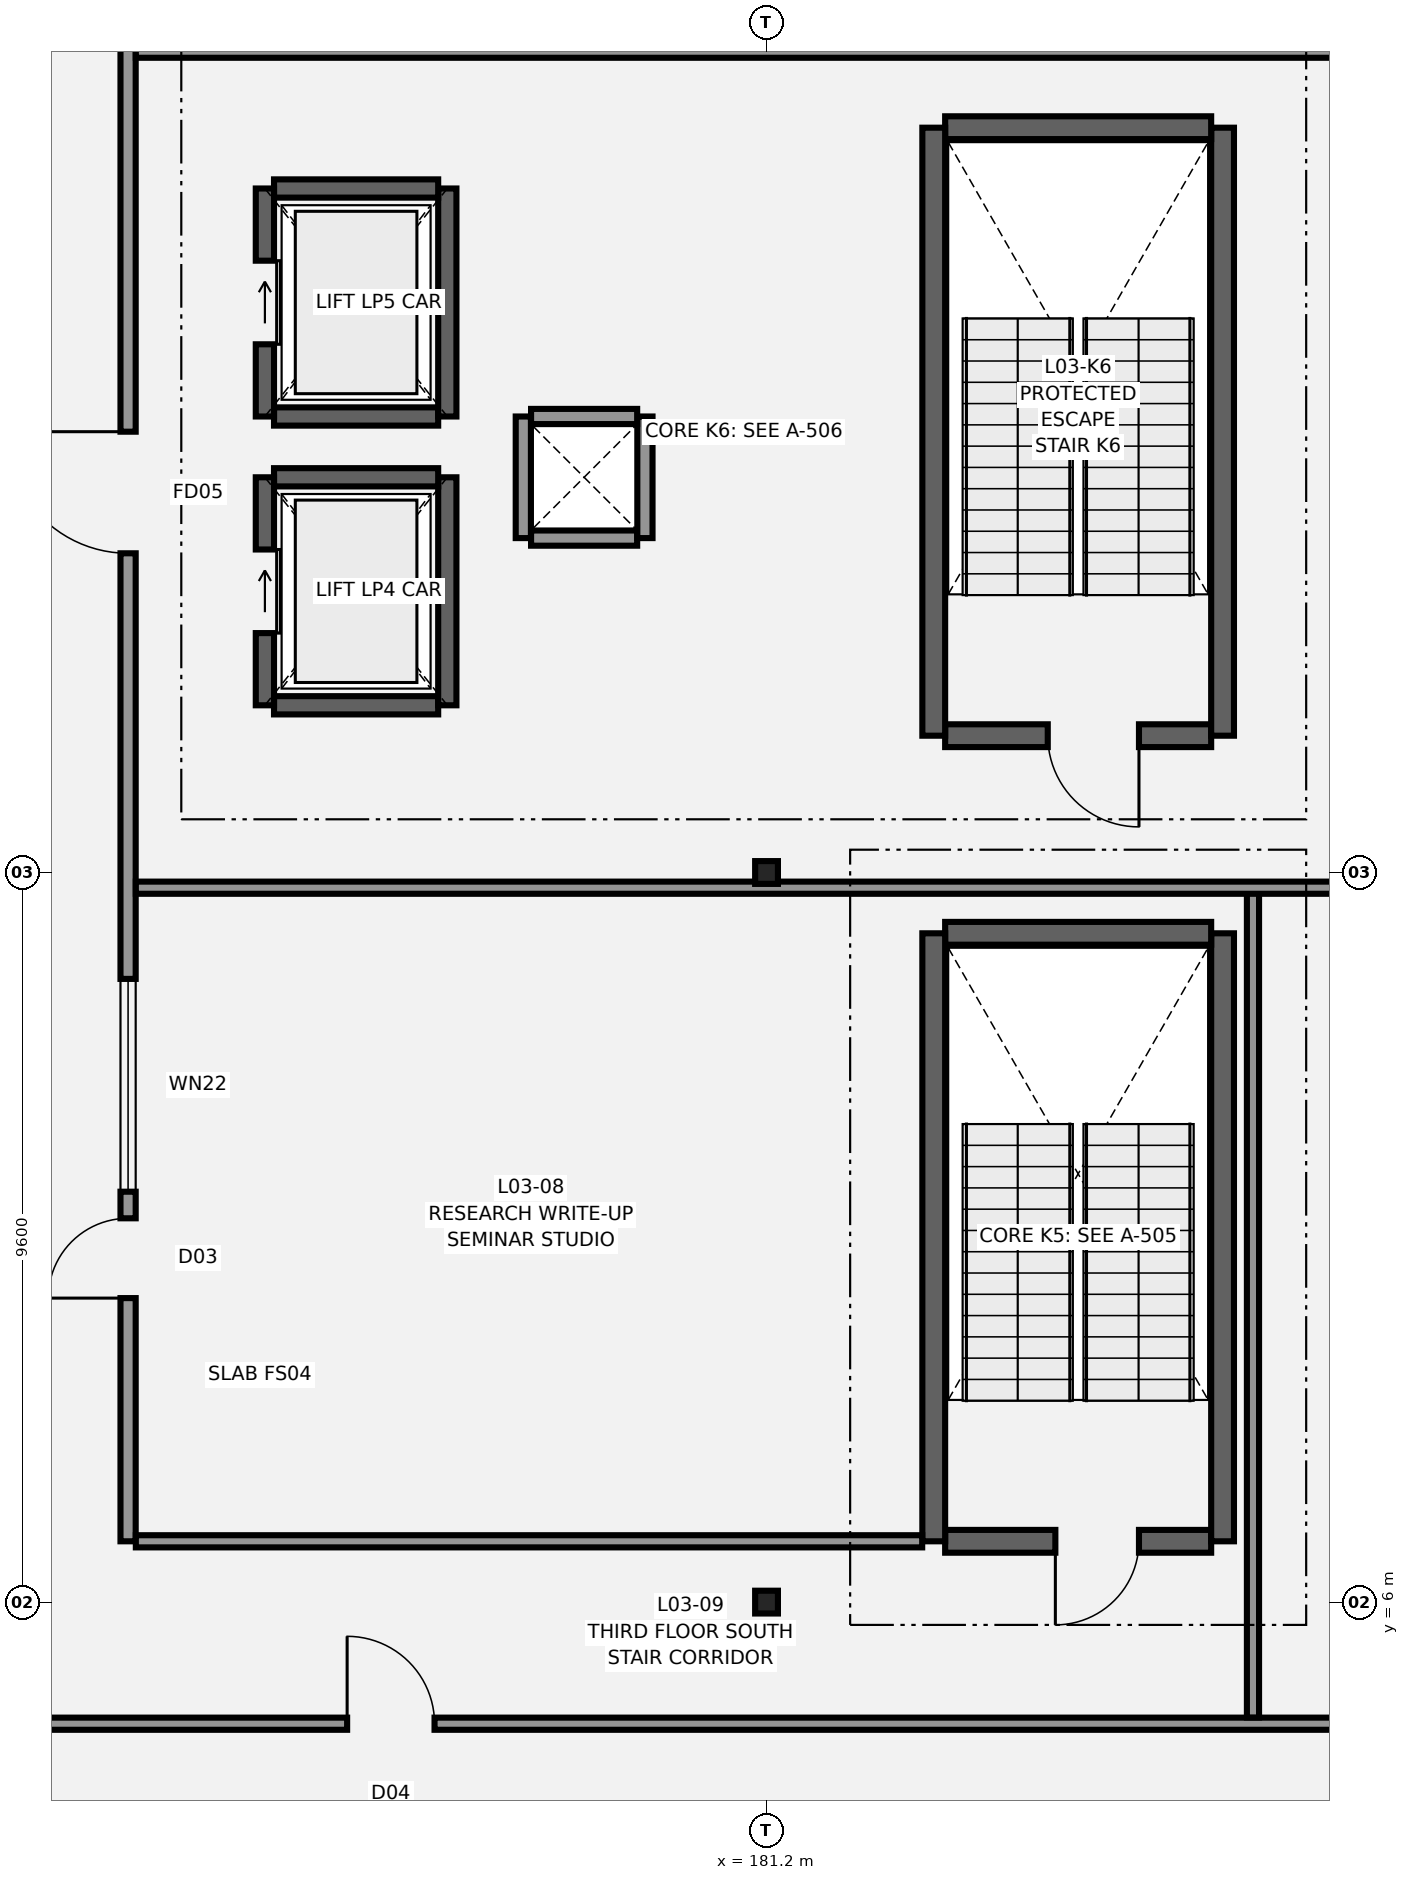
"""IFC4 building model, lengths in metres.
Left out: names, types, materials, properties, quantities, classifications, styles, units other than length and angle.
Written with IfcOpenShell. Run it as: python <this file> out.ifc"""

import sys

from ifc_helpers import new_model, si_unit, direction, frame, frame_2d, origin, origin_2d, place, context, subcontext, project, spatial, rectangle, i_section, extrude, element, fill, save


model = new_model("IFC4")
c1 = context("Model", 3, precision=1e-05, world=origin(), true_north=direction((0.0, 1.0)))
c2 = subcontext(c1, "Body", "Model", "MODEL_VIEW")
j1 = project(units=[si_unit("LENGTHUNIT", "METRE"), si_unit("PLANEANGLEUNIT", "RADIAN")], contexts=[c1])
p1 = place(None, origin())
s1 = spatial("IfcSite", under=j1, at=p1, CompositionType="ELEMENT")
p2 = place(p1, origin())
s2 = spatial("IfcBuilding", under=s1, at=p2, CompositionType="ELEMENT")
p3 = place(p2, frame((0.0, 0.0, 14.4)))
s3 = spatial("IfcBuildingStorey", under=s2, at=p3, CompositionType="ELEMENT", Elevation=14.4)
for number, where, z_axis, x_axis in (
    (1, (181.2, 6.0, 0.0), (0.0, 0.0, 1.0), (1.0, 0.0, 0.0)),
    (2, (181.2, 15.6, 0.0), (0.0, 0.0, 1.0), (1.0, 0.0, 0.0)),
):
    element("IfcColumn", number, at=place(p3, frame(where, z_axis=z_axis, x_axis=x_axis)), inside=s3, PredefinedType="COLUMN", context=c2, shape_type="SweptSolid", body=[
        extrude(i_section(OverallWidth=0.3, OverallDepth=0.3, WebThickness=0.011, FlangeThickness=0.019, FilletRadius=0.027, at=origin_2d()), origin(), (0.0, 0.0, 1.0), 4.2),
    ])
p4 = place(p3, frame((187.05, 6.8, 0.0), z_axis=(0.0, 0.0, 1.0), x_axis=(-1.0, 0.0, 0.0)))
e3 = element("IfcWall", 3, at=p4, inside=s3, PredefinedType="SHEAR", context=c2, shape_type="SweptSolid", body=[
    extrude(rectangle(XDim=3.5, YDim=0.3, at=frame_2d((1.75, 0.0))), origin(), (0.0, 0.0, 1.0), 3.98),
])
p5 = place(p4, frame((0.95, 0.0, 0.0)))
e4 = element("IfcOpeningElement", 4, at=p5, cuts=e3, PredefinedType="OPENING", context=c2, shape_type="SweptSolid", body=[
    extrude(rectangle(XDim=1.1, YDim=2.15, at=frame_2d((0.55, 1.075))), frame((0.0, 0.16, 0.0), z_axis=(0.0, -1.0, 0.0), x_axis=(1.0, 0.0, 0.0)), (0.0, 0.0, 1.0), 0.32),
])
p6 = place(p3, frame((187.2, 6.8, 0.0), z_axis=(0.0, 0.0, 1.0), x_axis=(0.0, 1.0, 0.0)))
e5 = element("IfcWall", 5, at=p6, inside=s3, PredefinedType="SHEAR", context=c2, shape_type="SweptSolid", body=[
    extrude(rectangle(XDim=8.0, YDim=0.3, at=frame_2d((4.0, 0.0))), origin(), (0.0, 0.0, 1.0), 3.98),
])
p7 = place(p3, frame((187.05, 14.8, 0.0), z_axis=(0.0, 0.0, 1.0), x_axis=(-1.0, 0.0, 0.0)))
e6 = element("IfcWall", 6, at=p7, inside=s3, PredefinedType="SHEAR", context=c2, shape_type="SweptSolid", body=[
    extrude(rectangle(XDim=3.5, YDim=0.3, at=frame_2d((1.75, 0.0))), origin(), (0.0, 0.0, 1.0), 3.98),
])
p8 = place(p3, frame((183.4, 14.8, 0.0), z_axis=(0.0, 0.0, 1.0), x_axis=(0.0, -1.0, 0.0)))
e7 = element("IfcWall", 7, at=p8, inside=s3, PredefinedType="SHEAR", context=c2, shape_type="SweptSolid", body=[
    extrude(rectangle(XDim=8.0, YDim=0.3, at=frame_2d((4.0, 0.0))), origin(), (0.0, 0.0, 1.0), 3.98),
])
p9 = place(p3, frame((187.05, 17.4, 0.0), z_axis=(0.0, 0.0, 1.0), x_axis=(-1.0, 0.0, 0.0)))
e8 = element("IfcWall", 8, at=p9, inside=s3, PredefinedType="SHEAR", context=c2, shape_type="SweptSolid", body=[
    extrude(rectangle(XDim=3.5, YDim=0.3, at=frame_2d((1.75, 0.0))), origin(), (0.0, 0.0, 1.0), 3.98),
])
p10 = place(p9, frame((0.95, 0.0, 0.0)))
e9 = element("IfcOpeningElement", 9, at=p10, cuts=e8, PredefinedType="OPENING", context=c2, shape_type="SweptSolid", body=[
    extrude(rectangle(XDim=1.2, YDim=2.2, at=frame_2d((0.6, 1.1))), frame((0.0, 0.16, 0.0), z_axis=(0.0, -1.0, 0.0), x_axis=(1.0, 0.0, 0.0)), (0.0, 0.0, 1.0), 0.32),
])
p11 = place(p3, frame((187.2, 17.4, 0.0), z_axis=(0.0, 0.0, 1.0), x_axis=(0.0, 1.0, 0.0)))
e10 = element("IfcWall", 10, at=p11, inside=s3, PredefinedType="SHEAR", context=c2, shape_type="SweptSolid", body=[
    extrude(rectangle(XDim=8.0, YDim=0.3, at=frame_2d((4.0, 0.0))), origin(), (0.0, 0.0, 1.0), 3.98),
])
p12 = place(p3, frame((187.05, 25.4, 0.0), z_axis=(0.0, 0.0, 1.0), x_axis=(-1.0, 0.0, 0.0)))
e11 = element("IfcWall", 11, at=p12, inside=s3, PredefinedType="SHEAR", context=c2, shape_type="SweptSolid", body=[
    extrude(rectangle(XDim=3.5, YDim=0.3, at=frame_2d((1.75, 0.0))), origin(), (0.0, 0.0, 1.0), 3.98),
])
p13 = place(p3, frame((183.4, 25.4, 0.0), z_axis=(0.0, 0.0, 1.0), x_axis=(0.0, -1.0, 0.0)))
e12 = element("IfcWall", 12, at=p13, inside=s3, PredefinedType="SHEAR", context=c2, shape_type="SweptSolid", body=[
    extrude(rectangle(XDim=8.0, YDim=0.3, at=frame_2d((4.0, 0.0))), origin(), (0.0, 0.0, 1.0), 3.98),
])
p14 = place(p3, frame((174.72, 17.8, 0.0), z_axis=(0.0, 0.0, 1.0), x_axis=(1.0, 0.0, 0.0)))
e13 = element("IfcWall", 13, at=p14, inside=s3, PredefinedType="SHEAR", context=c2, shape_type="SweptSolid", body=[
    extrude(rectangle(XDim=2.16, YDim=0.24, at=frame_2d((1.08, 0.0))), origin(), (0.0, 0.0, 1.0), 3.98),
])
p15 = place(p3, frame((177.0, 17.8, 0.0), z_axis=(0.0, 0.0, 1.0), x_axis=(0.0, 1.0, 0.0)))
e14 = element("IfcWall", 14, at=p15, inside=s3, PredefinedType="SHEAR", context=c2, shape_type="SweptSolid", body=[
    extrude(rectangle(XDim=3.0, YDim=0.24, at=frame_2d((1.5, 0.0))), origin(), (0.0, 0.0, 1.0), 3.98),
])
p16 = place(p3, frame((176.88, 20.8, 0.0), z_axis=(0.0, 0.0, 1.0), x_axis=(-1.0, 0.0, 0.0)))
e15 = element("IfcWall", 15, at=p16, inside=s3, PredefinedType="SHEAR", context=c2, shape_type="SweptSolid", body=[
    extrude(rectangle(XDim=2.16, YDim=0.24, at=frame_2d((1.08, 0.0))), origin(), (0.0, 0.0, 1.0), 3.98),
])
p17 = place(p3, frame((174.6, 20.8, 0.0), z_axis=(0.0, 0.0, 1.0), x_axis=(0.0, -1.0, 0.0)))
e16 = element("IfcWall", 16, at=p17, inside=s3, PredefinedType="SHEAR", context=c2, shape_type="SweptSolid", body=[
    extrude(rectangle(XDim=3.0, YDim=0.24, at=frame_2d((1.5, 0.0))), origin(), (0.0, 0.0, 1.0), 3.98),
])
p18 = place(p17, frame((0.95, 0.0, 0.0)))
e17 = element("IfcOpeningElement", 17, at=p18, cuts=e16, PredefinedType="OPENING", context=c2, shape_type="SweptSolid", body=[
    extrude(rectangle(XDim=1.1, YDim=2.1, at=frame_2d((0.55, 1.05))), frame((0.0, 0.13, 0.0), z_axis=(0.0, -1.0, 0.0), x_axis=(1.0, 0.0, 0.0)), (0.0, 0.0, 1.0), 0.26),
])
p19 = place(p3, frame((174.72, 21.6, 0.0), z_axis=(0.0, 0.0, 1.0), x_axis=(1.0, 0.0, 0.0)))
e18 = element("IfcWall", 18, at=p19, inside=s3, PredefinedType="SHEAR", context=c2, shape_type="SweptSolid", body=[
    extrude(rectangle(XDim=2.16, YDim=0.24, at=frame_2d((1.08, 0.0))), origin(), (0.0, 0.0, 1.0), 3.98),
])
p20 = place(p3, frame((177.0, 21.6, 0.0), z_axis=(0.0, 0.0, 1.0), x_axis=(0.0, 1.0, 0.0)))
e19 = element("IfcWall", 19, at=p20, inside=s3, PredefinedType="SHEAR", context=c2, shape_type="SweptSolid", body=[
    extrude(rectangle(XDim=3.0, YDim=0.24, at=frame_2d((1.5, 0.0))), origin(), (0.0, 0.0, 1.0), 3.98),
])
p21 = place(p3, frame((176.88, 24.6, 0.0), z_axis=(0.0, 0.0, 1.0), x_axis=(-1.0, 0.0, 0.0)))
e20 = element("IfcWall", 20, at=p21, inside=s3, PredefinedType="SHEAR", context=c2, shape_type="SweptSolid", body=[
    extrude(rectangle(XDim=2.16, YDim=0.24, at=frame_2d((1.08, 0.0))), origin(), (0.0, 0.0, 1.0), 3.98),
])
p22 = place(p3, frame((174.6, 24.6, 0.0), z_axis=(0.0, 0.0, 1.0), x_axis=(0.0, -1.0, 0.0)))
e21 = element("IfcWall", 21, at=p22, inside=s3, PredefinedType="SHEAR", context=c2, shape_type="SweptSolid", body=[
    extrude(rectangle(XDim=3.0, YDim=0.24, at=frame_2d((1.5, 0.0))), origin(), (0.0, 0.0, 1.0), 3.98),
])
p23 = place(p22, frame((0.95, 0.0, 0.0)))
e22 = element("IfcOpeningElement", 22, at=p23, cuts=e21, PredefinedType="OPENING", context=c2, shape_type="SweptSolid", body=[
    extrude(rectangle(XDim=1.1, YDim=2.1, at=frame_2d((0.55, 1.05))), frame((0.0, 0.13, 0.0), z_axis=(0.0, -1.0, 0.0), x_axis=(1.0, 0.0, 0.0)), (0.0, 0.0, 1.0), 0.26),
])
p24 = place(p3, frame((159.682, 4.4, 0.0), z_axis=(0.0, 0.0, 1.0), x_axis=(1.0, 0.0, 0.0)))
e23 = element("IfcWall", 23, at=p24, inside=s3, PredefinedType="PARTITIONING", context=c2, shape_type="SweptSolid", body=[
    extrude(rectangle(XDim=32.126, YDim=0.16, at=frame_2d((16.063, 0.0))), origin(), (0.0, 0.0, 1.0), 3.84),
])
p25 = place(p24, frame((16.0, 0.0, 0.0)))
e24 = element("IfcOpeningElement", 24, at=p25, cuts=e23, PredefinedType="OPENING", context=c2, shape_type="SweptSolid", body=[
    extrude(rectangle(XDim=1.15, YDim=2.15, at=frame_2d((0.575, 1.075))), frame((0.0, 0.09, 0.0), z_axis=(0.0, -1.0, 0.0), x_axis=(1.0, 0.0, 0.0)), (0.0, 0.0, 1.0), 0.18),
])
p26 = place(p3, frame((172.8, 6.8, 0.0), z_axis=(0.0, 0.0, 1.0), x_axis=(0.0, 1.0, 0.0)))
e25 = element("IfcWall", 25, at=p26, inside=s3, PredefinedType="PARTITIONING", context=c2, shape_type="SweptSolid", body=[
    extrude(rectangle(XDim=32.628, YDim=0.2, at=frame_2d((16.314, 0.0))), origin(), (0.0, 0.0, 1.0), 3.84),
])
p27 = place(p26, frame((3.2, 0.0, 0.0)))
e26 = element("IfcOpeningElement", 26, at=p27, cuts=e25, PredefinedType="OPENING", context=c2, shape_type="SweptSolid", body=[
    extrude(rectangle(XDim=1.05, YDim=2.15, at=frame_2d((0.525, 1.075))), frame((0.0, 0.11, 0.0), z_axis=(0.0, -1.0, 0.0), x_axis=(1.0, 0.0, 0.0)), (0.0, 0.0, 1.0), 0.22),
])
p28 = place(p26, frame((13.0, 0.0, 0.0)))
e27 = element("IfcOpeningElement", 27, at=p28, cuts=e25, PredefinedType="OPENING", context=c2, shape_type="SweptSolid", body=[
    extrude(rectangle(XDim=1.6, YDim=2.2, at=frame_2d((0.8, 1.1))), frame((0.0, 0.11, 0.0), z_axis=(0.0, -1.0, 0.0), x_axis=(1.0, 0.0, 0.0)), (0.0, 0.0, 1.0), 0.22),
])
p29 = place(p26, frame((22.8, 0.0, 0.0)))
e28 = element("IfcOpeningElement", 28, at=p29, cuts=e25, PredefinedType="OPENING", context=c2, shape_type="SweptSolid", body=[
    extrude(rectangle(XDim=1.15, YDim=2.15, at=frame_2d((0.575, 1.075))), frame((0.0, 0.11, 0.0), z_axis=(0.0, -1.0, 0.0), x_axis=(1.0, 0.0, 0.0)), (0.0, 0.0, 1.0), 0.22),
])
p30 = place(p26, frame((29.2, 0.0, 0.0)))
e29 = element("IfcOpeningElement", 29, at=p30, cuts=e25, PredefinedType="OPENING", context=c2, shape_type="SweptSolid", body=[
    extrude(rectangle(XDim=1.02, YDim=2.12, at=frame_2d((0.51, 1.06))), frame((0.0, 0.11, 0.0), z_axis=(0.0, -1.0, 0.0), x_axis=(1.0, 0.0, 0.0)), (0.0, 0.0, 1.0), 0.22),
])
p31 = place(p26, frame((4.6, 0.0, 1.05)))
e30 = element("IfcOpeningElement", 30, at=p31, cuts=e25, PredefinedType="OPENING", context=c2, shape_type="SweptSolid", body=[
    extrude(rectangle(XDim=2.8, YDim=1.3, at=frame_2d((1.4, 0.65))), frame((0.0, 0.11, 0.0), z_axis=(0.0, -1.0, 0.0), x_axis=(1.0, 0.0, 0.0)), (0.0, 0.0, 1.0), 0.22),
])
p32 = place(p3, frame((172.902, 6.8, 0.0), z_axis=(0.0, 0.0, 1.0), x_axis=(1.0, 0.0, 0.0)))
e31 = element("IfcWall", 31, at=p32, inside=s3, PredefinedType="PARTITIONING", context=c2, shape_type="SweptSolid", body=[
    extrude(rectangle(XDim=10.346, YDim=0.16, at=frame_2d((5.173, 0.0))), origin(), (0.0, 0.0, 1.0), 3.84),
])
p33 = place(p3, frame((187.6, 4.482, 0.0), z_axis=(0.0, 0.0, 1.0), x_axis=(0.0, 1.0, 0.0)))
e32 = element("IfcWall", 32, at=p33, inside=s3, PredefinedType="PARTITIONING", context=c2, shape_type="SweptSolid", body=[
    extrude(rectangle(XDim=10.918, YDim=0.16, at=frame_2d((5.459, 0.0))), origin(), (0.0, 0.0, 1.0), 3.84),
])
p34 = place(p3, frame((172.902, 15.4, 0.0), z_axis=(0.0, 0.0, 1.0), x_axis=(1.0, 0.0, 0.0)))
e33 = element("IfcWall", 33, at=p34, inside=s3, PredefinedType="PARTITIONING", context=c2, shape_type="SweptSolid", body=[
    extrude(rectangle(XDim=18.798, YDim=0.16, at=frame_2d((9.399, 0.0))), origin(), (0.0, 0.0, 1.0), 3.535),
])
p35 = place(p3, frame((172.902, 26.4, 0.0), z_axis=(0.0, 0.0, 1.0), x_axis=(1.0, 0.0, 0.0)))
e34 = element("IfcWall", 34, at=p35, inside=s3, PredefinedType="PARTITIONING", context=c2, shape_type="SweptSolid", body=[
    extrude(rectangle(XDim=18.906, YDim=0.16, at=frame_2d((9.453, 0.0))), origin(), (0.0, 0.0, 1.0), 3.84),
])
p36 = place(p3, frame((178.102, 20.0, 0.0), z_axis=(0.0, 0.0, 1.0), x_axis=(1.0, 0.0, 0.0)))
e35 = element("IfcWall", 35, at=p36, inside=s3, PredefinedType="PARTITIONING", context=c2, shape_type="SweptSolid", body=[
    extrude(rectangle(XDim=1.396, YDim=0.2, at=frame_2d((0.698, 0.0))), origin(), (0.0, 0.0, 1.0), 3.84),
])
p37 = place(p3, frame((179.6, 20.0, 0.0), z_axis=(0.0, 0.0, 1.0), x_axis=(0.0, 1.0, 0.0)))
e36 = element("IfcWall", 36, at=p37, inside=s3, PredefinedType="PARTITIONING", context=c2, shape_type="SweptSolid", body=[
    extrude(rectangle(XDim=1.6, YDim=0.2, at=frame_2d((0.8, 0.0))), origin(), (0.0, 0.0, 1.0), 3.84),
])
p38 = place(p3, frame((179.498, 21.6, 0.0), z_axis=(0.0, 0.0, 1.0), x_axis=(-1.0, 0.0, 0.0)))
e37 = element("IfcWall", 37, at=p38, inside=s3, PredefinedType="PARTITIONING", context=c2, shape_type="SweptSolid", body=[
    extrude(rectangle(XDim=1.396, YDim=0.2, at=frame_2d((0.698, 0.0))), origin(), (0.0, 0.0, 1.0), 3.84),
])
p39 = place(p3, frame((178.0, 21.6, 0.0), z_axis=(0.0, 0.0, 1.0), x_axis=(0.0, -1.0, 0.0)))
e38 = element("IfcWall", 38, at=p39, inside=s3, PredefinedType="PARTITIONING", context=c2, shape_type="SweptSolid", body=[
    extrude(rectangle(XDim=1.6, YDim=0.2, at=frame_2d((0.8, 0.0))), origin(), (0.0, 0.0, 1.0), 3.84),
])
p40 = place(p25, origin())
e39 = element("IfcDoor", 39, at=p40, inside=s3, OperationType="SINGLE_SWING_LEFT", PredefinedType="DOOR", context=c2, shape_type="SweptSolid", body=[
    extrude(rectangle(XDim=1.15, YDim=2.15, at=frame_2d((0.575, 1.075))), frame((0.0, 0.025, 0.0), z_axis=(0.0, -1.0, 0.0), x_axis=(1.0, 0.0, 0.0)), (0.0, 0.0, 1.0), 0.05),
])
fill(e24, e39)
p41 = place(p27, origin())
e40 = element("IfcDoor", 40, at=p41, inside=s3, OperationType="SINGLE_SWING_LEFT", PredefinedType="DOOR", context=c2, shape_type="SweptSolid", body=[
    extrude(rectangle(XDim=1.05, YDim=2.15, at=frame_2d((0.525, 1.075))), frame((0.0, 0.025, 0.0), z_axis=(0.0, -1.0, 0.0), x_axis=(1.0, 0.0, 0.0)), (0.0, 0.0, 1.0), 0.05),
])
fill(e26, e40)
p42 = place(p28, origin())
e41 = element("IfcDoor", 41, at=p42, inside=s3, OperationType="SINGLE_SWING_RIGHT", PredefinedType="DOOR", context=c2, shape_type="SweptSolid", body=[
    extrude(rectangle(XDim=1.6, YDim=2.2, at=frame_2d((0.8, 1.1))), frame((0.0, 0.025, 0.0), z_axis=(0.0, -1.0, 0.0), x_axis=(1.0, 0.0, 0.0)), (0.0, 0.0, 1.0), 0.05),
])
fill(e27, e41)
p43 = place(p31, origin())
e42 = element("IfcWindow", 42, at=p43, inside=s3, PartitioningType="SINGLE_PANEL", PredefinedType="WINDOW", context=c2, shape_type="SweptSolid", body=[
    extrude(rectangle(XDim=2.8, YDim=1.3, at=frame_2d((1.4, 0.65))), frame((0.0, 0.03, 0.0), z_axis=(0.0, -1.0, 0.0), x_axis=(1.0, 0.0, 0.0)), (0.0, 0.0, 1.0), 0.06),
])
fill(e30, e42)
p44 = place(p5, origin())
e43 = element("IfcDoor", 43, at=p44, inside=s3, OperationType="SINGLE_SWING_RIGHT", PredefinedType="DOOR", context=c2, shape_type="SweptSolid", body=[
    extrude(rectangle(XDim=1.1, YDim=2.15, at=frame_2d((0.55, 1.075))), frame((0.0, 0.025, 0.0), z_axis=(0.0, -1.0, 0.0), x_axis=(1.0, 0.0, 0.0)), (0.0, 0.0, 1.0), 0.05),
])
fill(e4, e43)
p45 = place(p10, origin())
e44 = element("IfcDoor", 44, at=p45, inside=s3, OperationType="SINGLE_SWING_LEFT", PredefinedType="DOOR", context=c2, shape_type="SweptSolid", body=[
    extrude(rectangle(XDim=1.2, YDim=2.2, at=frame_2d((0.6, 1.1))), frame((0.0, 0.025, 0.0), z_axis=(0.0, -1.0, 0.0), x_axis=(1.0, 0.0, 0.0)), (0.0, 0.0, 1.0), 0.05),
])
fill(e9, e44)
p46 = place(p18, origin())
e45 = element("IfcDoor", 45, at=p46, inside=s3, OperationType="SLIDING_TO_LEFT", PredefinedType="DOOR", context=c2, shape_type="SweptSolid", body=[
    extrude(rectangle(XDim=1.1, YDim=2.1, at=frame_2d((0.55, 1.05))), frame((0.0, 0.025, 0.0), z_axis=(0.0, -1.0, 0.0), x_axis=(1.0, 0.0, 0.0)), (0.0, 0.0, 1.0), 0.05),
])
fill(e17, e45)
p47 = place(p23, origin())
e46 = element("IfcDoor", 46, at=p47, inside=s3, OperationType="SLIDING_TO_LEFT", PredefinedType="DOOR", context=c2, shape_type="SweptSolid", body=[
    extrude(rectangle(XDim=1.1, YDim=2.1, at=frame_2d((0.55, 1.05))), frame((0.0, 0.025, 0.0), z_axis=(0.0, -1.0, 0.0), x_axis=(1.0, 0.0, 0.0)), (0.0, 0.0, 1.0), 0.05),
])
fill(e22, e46)
save(model, sys.argv[1])
